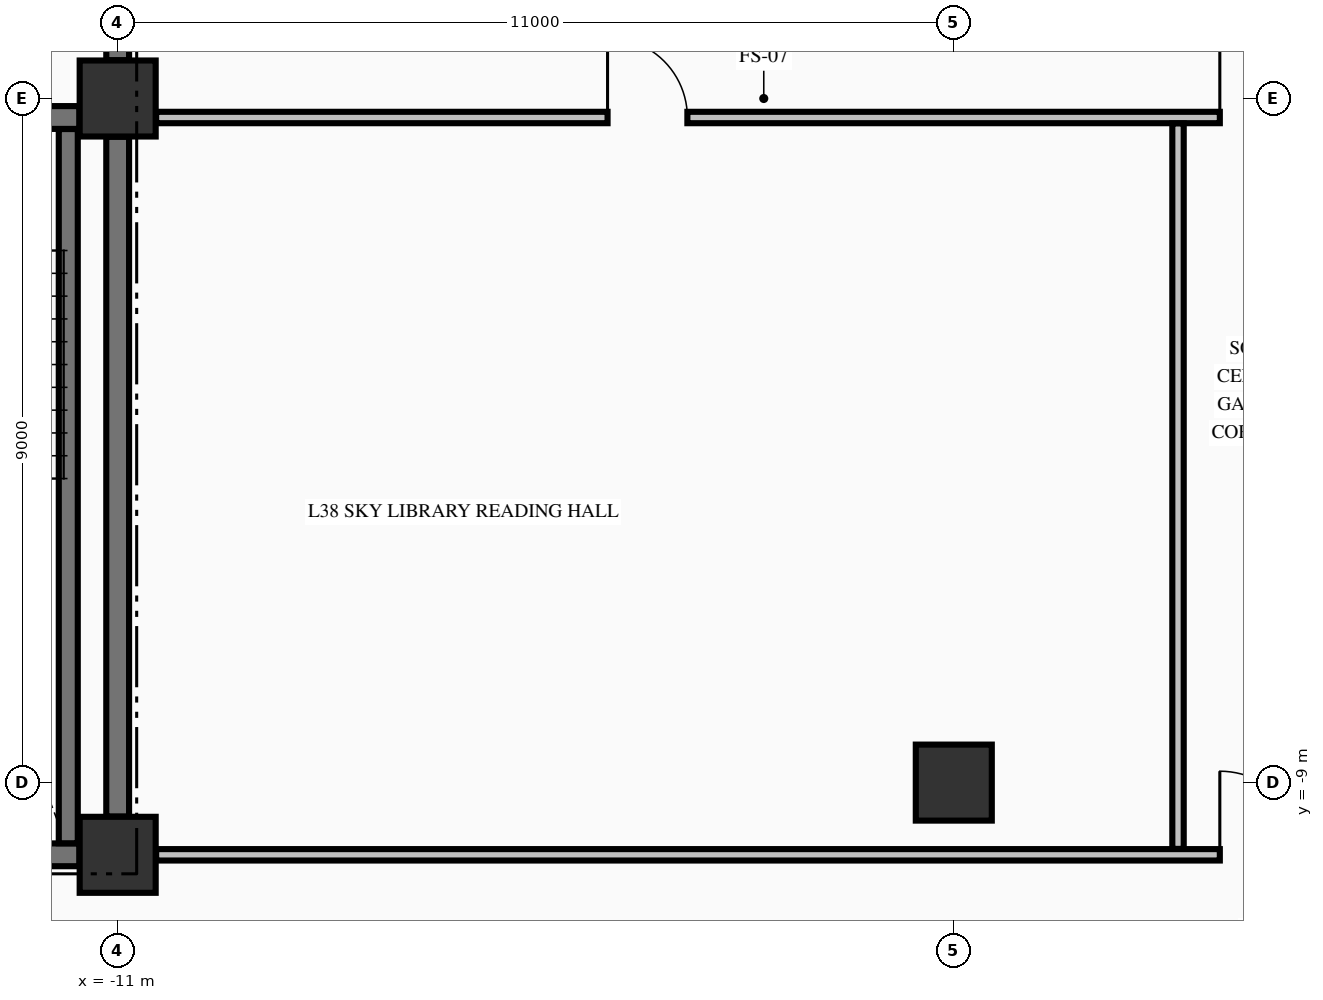
"""IFC4 building model, lengths in metres.
Left out: names, types, materials, properties, quantities, classifications, styles, units other than length and angle.
Written with IfcOpenShell. Run it as: python <this file> out.ifc"""

import sys

from ifc_helpers import new_model, si_unit, direction, frame, frame_2d, origin, origin_2d, place, context, subcontext, project, spatial, rectangle, extrude, element, fill, save


model = new_model("IFC4")
c1 = context("Model", 3, precision=1e-05, world=origin(), true_north=direction((0.0, 1.0)))
c2 = subcontext(c1, "Body", "Model", "MODEL_VIEW")
j1 = project(units=[si_unit("LENGTHUNIT", "METRE"), si_unit("PLANEANGLEUNIT", "RADIAN")], contexts=[c1])
p1 = place(None, origin())
s1 = spatial("IfcSite", under=j1, at=p1, CompositionType="ELEMENT")
p2 = place(p1, origin())
s2 = spatial("IfcBuilding", under=s1, at=p2, CompositionType="ELEMENT")
p3 = place(p2, frame((0.0, 0.0, 149.91)))
s3 = spatial("IfcBuildingStorey", under=s2, at=p3, CompositionType="ELEMENT", Elevation=149.91)
for number, where, z_axis, x_axis in (
    (1, (-11.0, -9.95, -0.25), (0.0, 0.0, 1.0), (1.0, 0.0, 0.0)),
    (2, (-11.0, 0.0, -0.25), (0.0, 0.0, 1.0), (1.0, 0.0, 0.0)),
    (3, (0.0, -9.0, -0.25), (0.0, 0.0, 1.0), (1.0, 0.0, 0.0)),
):
    element("IfcColumn", number, at=place(p3, frame(where, z_axis=z_axis, x_axis=x_axis)), inside=s3, PredefinedType="COLUMN", context=c2, shape_type="SweptSolid", body=[
        extrude(rectangle(XDim=1.0, YDim=1.0, at=origin_2d()), origin(), (0.0, 0.0, 1.0), 3.395),
    ])
p4 = place(p3, frame((-14.7, -9.95, 0.0), z_axis=(0.0, 0.0, 1.0), x_axis=(1.0, 0.0, 0.0)))
e4 = element("IfcWall", 4, at=p4, inside=s3, PredefinedType="SHEAR", context=c2, shape_type="SweptSolid", body=[
    extrude(rectangle(XDim=3.196, YDim=0.3, at=frame_2d((1.598, 0.0))), origin(), (0.0, 0.0, 1.0), 3.145),
])
p5 = place(p3, frame((-19.496, -0.25, 0.0), z_axis=(0.0, 0.0, 1.0), x_axis=(1.0, 0.0, 0.0)))
e5 = element("IfcWall", 5, at=p5, inside=s3, PredefinedType="SHEAR", context=c2, shape_type="SweptSolid", body=[
    extrude(rectangle(XDim=7.992, YDim=0.3, at=frame_2d((3.996, 0.0))), origin(), (0.0, 0.0, 1.0), 3.145),
])
p6 = place(p5, frame((5.796, 0.0, 0.0)))
e6 = element("IfcOpeningElement", 6, at=p6, cuts=e5, PredefinedType="OPENING", context=c2, shape_type="SweptSolid", body=[
    extrude(rectangle(XDim=1.1, YDim=2.15, at=frame_2d((0.55, 1.075))), frame((0.0, 0.16, 0.0), z_axis=(0.0, -1.0, 0.0), x_axis=(1.0, 0.0, 0.0)), (0.0, 0.0, 1.0), 0.32),
])
p7 = place(p3, frame((-10.494, -9.95, 0.0), z_axis=(0.0, 0.0, 1.0), x_axis=(1.0, 0.0, 0.0)))
e7 = element("IfcWall", 7, at=p7, inside=s3, PredefinedType="PARTITIONING", context=c2, shape_type="SweptSolid", body=[
    extrude(rectangle(XDim=20.988, YDim=0.15, at=frame_2d((10.494, 0.0))), origin(), (0.0, 0.0, 1.0), 3.145),
])
p8 = place(p7, frame((13.994, 0.0, 0.0)))
e8 = element("IfcOpeningElement", 8, at=p8, cuts=e7, PredefinedType="OPENING", context=c2, shape_type="SweptSolid", body=[
    extrude(rectangle(XDim=1.1, YDim=2.15, at=frame_2d((0.55, 1.075))), frame((0.0, 0.085, 0.0), z_axis=(0.0, -1.0, 0.0), x_axis=(1.0, 0.0, 0.0)), (0.0, 0.0, 1.0), 0.17),
])
p9 = place(p7, frame((19.489, 0.0, 0.0)))
e9 = element("IfcOpeningElement", 9, at=p9, cuts=e7, PredefinedType="OPENING", context=c2, shape_type="SweptSolid", body=[
    extrude(rectangle(XDim=0.95, YDim=2.15, at=frame_2d((0.475, 1.075))), frame((0.0, 0.085, 0.0), z_axis=(0.0, -1.0, 0.0), x_axis=(1.0, 0.0, 0.0)), (0.0, 0.0, 1.0), 0.17),
])
p10 = place(p3, frame((-10.494, -0.25, 0.0), z_axis=(0.0, 0.0, 1.0), x_axis=(1.0, 0.0, 0.0)))
e10 = element("IfcWall", 10, at=p10, inside=s3, PredefinedType="PARTITIONING", context=c2, shape_type="SweptSolid", body=[
    extrude(rectangle(XDim=20.988, YDim=0.15, at=frame_2d((10.494, 0.0))), origin(), (0.0, 0.0, 1.0), 3.145),
])
p11 = place(p10, frame((13.994, 0.0, 0.0)))
e11 = element("IfcOpeningElement", 11, at=p11, cuts=e10, PredefinedType="OPENING", context=c2, shape_type="SweptSolid", body=[
    extrude(rectangle(XDim=1.1, YDim=2.15, at=frame_2d((0.55, 1.075))), frame((0.0, 0.085, 0.0), z_axis=(0.0, -1.0, 0.0), x_axis=(1.0, 0.0, 0.0)), (0.0, 0.0, 1.0), 0.17),
])
p12 = place(p10, frame((5.939, 0.0, 0.0)))
e12 = element("IfcOpeningElement", 12, at=p12, cuts=e10, PredefinedType="OPENING", context=c2, shape_type="SweptSolid", body=[
    extrude(rectangle(XDim=1.05, YDim=2.15, at=frame_2d((0.525, 1.075))), frame((0.0, 0.085, 0.0), z_axis=(0.0, -1.0, 0.0), x_axis=(1.0, 0.0, 0.0)), (0.0, 0.0, 1.0), 0.17),
])
p13 = place(p10, frame((18.089, 0.0, 0.0)))
e13 = element("IfcOpeningElement", 13, at=p13, cuts=e10, PredefinedType="OPENING", context=c2, shape_type="SweptSolid", body=[
    extrude(rectangle(XDim=0.95, YDim=2.15, at=frame_2d((0.475, 1.075))), frame((0.0, 0.085, 0.0), z_axis=(0.0, -1.0, 0.0), x_axis=(1.0, 0.0, 0.0)), (0.0, 0.0, 1.0), 0.17),
])
p14 = place(p3, frame((-11.65, -9.798, 0.0), z_axis=(0.0, 0.0, 1.0), x_axis=(0.0, 1.0, 0.0)))
e14 = element("IfcWall", 14, at=p14, inside=s3, PredefinedType="SOLIDWALL", context=c2, shape_type="SweptSolid", body=[
    extrude(rectangle(XDim=9.396, YDim=0.25, at=frame_2d((4.698, 0.0))), origin(), (0.0, 0.0, 1.0), 3.145),
])
p15 = place(p3, frame((-11.0, -9.446, 0.0), z_axis=(0.0, 0.0, 1.0), x_axis=(0.0, 1.0, 0.0)))
e15 = element("IfcWall", 15, at=p15, inside=s3, PredefinedType="SHEAR", context=c2, shape_type="SweptSolid", body=[
    extrude(rectangle(XDim=8.942, YDim=0.3, at=frame_2d((4.471, 0.0))), origin(), (0.0, 0.0, 1.0), 3.145),
])
p16 = place(p3, frame((-11.0, 0.504, 0.0), z_axis=(0.0, 0.0, 1.0), x_axis=(0.0, 1.0, 0.0)))
e16 = element("IfcWall", 16, at=p16, inside=s3, PredefinedType="SHEAR", context=c2, shape_type="SweptSolid", body=[
    extrude(rectangle(XDim=2.244, YDim=0.3, at=frame_2d((1.122, 0.0))), origin(), (0.0, 0.0, 1.0), 3.145),
])
p17 = place(p16, frame((0.596, 0.0, 0.0)))
e17 = element("IfcOpeningElement", 17, at=p17, cuts=e16, PredefinedType="OPENING", context=c2, shape_type="SweptSolid", body=[
    extrude(rectangle(XDim=1.1, YDim=2.15, at=frame_2d((0.55, 1.075))), frame((0.0, 0.16, 0.0), z_axis=(0.0, -1.0, 0.0), x_axis=(1.0, 0.0, 0.0)), (0.0, 0.0, 1.0), 0.32),
])
p18 = place(p3, frame((2.95, -9.872, 0.0), z_axis=(0.0, 0.0, 1.0), x_axis=(0.0, 1.0, 0.0)))
e18 = element("IfcWall", 18, at=p18, inside=s3, PredefinedType="PARTITIONING", context=c2, shape_type="SweptSolid", body=[
    extrude(rectangle(XDim=9.544, YDim=0.15, at=frame_2d((4.772, 0.0))), origin(), (0.0, 0.0, 1.0), 3.145),
])
p19 = place(p8, origin())
e19 = element("IfcDoor", 19, at=p19, inside=s3, OperationType="SINGLE_SWING_LEFT", PredefinedType="DOOR", context=c2, shape_type="SweptSolid", body=[
    extrude(rectangle(XDim=1.1, YDim=2.15, at=frame_2d((0.55, 1.075))), frame((0.0, 0.025, 0.0), z_axis=(0.0, -1.0, 0.0), x_axis=(1.0, 0.0, 0.0)), (0.0, 0.0, 1.0), 0.05),
])
fill(e8, e19)
p20 = place(p11, origin())
e20 = element("IfcDoor", 20, at=p20, inside=s3, OperationType="SINGLE_SWING_LEFT", PredefinedType="DOOR", context=c2, shape_type="SweptSolid", body=[
    extrude(rectangle(XDim=1.1, YDim=2.15, at=frame_2d((0.55, 1.075))), frame((0.0, 0.025, 0.0), z_axis=(0.0, -1.0, 0.0), x_axis=(1.0, 0.0, 0.0)), (0.0, 0.0, 1.0), 0.05),
])
fill(e11, e20)
p21 = place(p12, origin())
e21 = element("IfcDoor", 21, at=p21, inside=s3, OperationType="SINGLE_SWING_LEFT", PredefinedType="DOOR", context=c2, shape_type="SweptSolid", body=[
    extrude(rectangle(XDim=1.05, YDim=2.15, at=frame_2d((0.525, 1.075))), frame((0.0, 0.025, 0.0), z_axis=(0.0, -1.0, 0.0), x_axis=(1.0, 0.0, 0.0)), (0.0, 0.0, 1.0), 0.05),
])
fill(e12, e21)
save(model, sys.argv[1])
